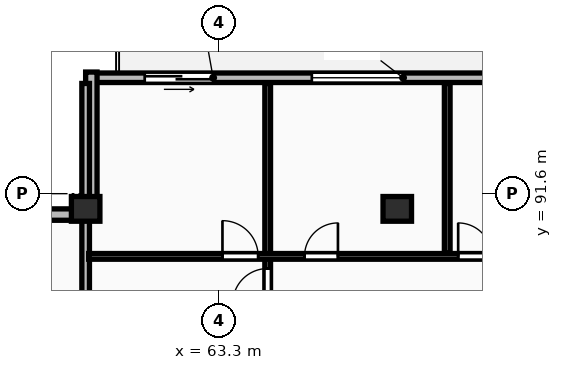
"""IFC4 building model, lengths in metres.
Left out: names, types, materials, properties, quantities, classifications, styles, units other than length and angle.
Written with IfcOpenShell. Run it as: python <this file> out.ifc"""

import sys

from ifc_helpers import new_model, si_unit, direction, frame, frame_2d, origin, origin_2d, place, context, subcontext, project, spatial, rectangle, extrude, element, fill, save


model = new_model("IFC4")
c1 = context("Model", 3, precision=1e-05, world=origin(), true_north=direction((0.0, 1.0)))
c2 = subcontext(c1, "Body", "Model", "MODEL_VIEW")
j1 = project(units=[si_unit("LENGTHUNIT", "METRE"), si_unit("PLANEANGLEUNIT", "RADIAN")], contexts=[c1])
p1 = place(None, origin())
s1 = spatial("IfcSite", under=j1, at=p1, CompositionType="ELEMENT")
p2 = place(p1, origin())
s2 = spatial("IfcBuilding", under=s1, at=p2, CompositionType="ELEMENT")
p3 = place(p2, frame((0.0, 0.0, 256.25)))
s3 = spatial("IfcBuildingStorey", under=s2, at=p3, CompositionType="ELEMENT", Elevation=256.25)
for number, where, z_axis, x_axis in (
    (1, (59.8, 91.2, 0.0), (0.0, 0.0, 1.0), (1.0, 0.0, 0.0)),
    (2, (68.0, 91.2, 0.0), (0.0, 0.0, 1.0), (1.0, 0.0, 0.0)),
):
    element("IfcColumn", number, at=place(p3, frame(where, z_axis=z_axis, x_axis=x_axis)), inside=s3, PredefinedType="COLUMN", context=c2, shape_type="SweptSolid", body=[
        extrude(rectangle(XDim=0.75, YDim=0.65, at=origin_2d()), origin(), (0.0, 0.0, 1.0), 3.45),
    ])
p4 = place(p3, frame((128.4, 94.65, 0.0), z_axis=(0.0, 0.0, 1.0), x_axis=(-1.0, 0.0, 0.0)))
e3 = element("IfcWall", 3, at=p4, inside=s3, PredefinedType="STANDARD", context=c2, shape_type="SweptSolid", body=[
    extrude(rectangle(XDim=68.6, YDim=0.25, at=frame_2d((34.3, 0.0))), origin(), (0.0, 0.0, 1.0), 3.17),
])
p5 = place(p4, frame((60.248, 0.0, 0.85)))
e4 = element("IfcOpeningElement", 4, at=p5, cuts=e3, PredefinedType="OPENING", context=c2, shape_type="SweptSolid", body=[
    extrude(rectangle(XDim=2.4, YDim=1.9, at=frame_2d((1.2, 0.95))), frame((0.0, 0.135, 0.0), z_axis=(0.0, -1.0, 0.0), x_axis=(1.0, 0.0, 0.0)), (0.0, 0.0, 1.0), 0.27),
])
p6 = place(p4, frame((55.523, 0.0, 0.85)))
e5 = element("IfcOpeningElement", 5, at=p6, cuts=e3, PredefinedType="OPENING", context=c2, shape_type="SweptSolid", body=[
    extrude(rectangle(XDim=2.4, YDim=1.9, at=frame_2d((1.2, 0.95))), frame((0.0, 0.135, 0.0), z_axis=(0.0, -1.0, 0.0), x_axis=(1.0, 0.0, 0.0)), (0.0, 0.0, 1.0), 0.27),
])
p7 = place(p4, frame((65.245, 0.0, 0.0)))
e6 = element("IfcOpeningElement", 6, at=p7, cuts=e3, PredefinedType="OPENING", context=c2, shape_type="SweptSolid", body=[
    extrude(rectangle(XDim=1.8, YDim=2.2, at=frame_2d((0.9, 1.1))), frame((0.0, 0.135, 0.0), z_axis=(0.0, -1.0, 0.0), x_axis=(1.0, 0.0, 0.0)), (0.0, 0.0, 1.0), 0.27),
])
p8 = place(p4, frame((50.836, 0.0, 0.85)))
e7 = element("IfcOpeningElement", 7, at=p8, cuts=e3, PredefinedType="OPENING", context=c2, shape_type="SweptSolid", body=[
    extrude(rectangle(XDim=2.4, YDim=1.9, at=frame_2d((1.2, 0.95))), frame((0.0, 0.135, 0.0), z_axis=(0.0, -1.0, 0.0), x_axis=(1.0, 0.0, 0.0)), (0.0, 0.0, 1.0), 0.27),
])
p9 = place(p4, frame((39.76, 0.0, 0.85)))
e8 = element("IfcOpeningElement", 8, at=p9, cuts=e3, PredefinedType="OPENING", context=c2, shape_type="SweptSolid", body=[
    extrude(rectangle(XDim=1.8, YDim=1.8, at=frame_2d((0.9, 0.9))), frame((0.0, 0.135, 0.0), z_axis=(0.0, -1.0, 0.0), x_axis=(1.0, 0.0, 0.0)), (0.0, 0.0, 1.0), 0.27),
])
p10 = place(p4, frame((37.04, 0.0, 0.85)))
e9 = element("IfcOpeningElement", 9, at=p10, cuts=e3, PredefinedType="OPENING", context=c2, shape_type="SweptSolid", body=[
    extrude(rectangle(XDim=1.8, YDim=1.8, at=frame_2d((0.9, 0.9))), frame((0.0, 0.135, 0.0), z_axis=(0.0, -1.0, 0.0), x_axis=(1.0, 0.0, 0.0)), (0.0, 0.0, 1.0), 0.27),
])
p11 = place(p4, frame((44.845, 0.0, 0.0)))
e10 = element("IfcOpeningElement", 10, at=p11, cuts=e3, PredefinedType="OPENING", context=c2, shape_type="SweptSolid", body=[
    extrude(rectangle(XDim=1.8, YDim=2.2, at=frame_2d((0.9, 1.1))), frame((0.0, 0.135, 0.0), z_axis=(0.0, -1.0, 0.0), x_axis=(1.0, 0.0, 0.0)), (0.0, 0.0, 1.0), 0.27),
])
p12 = place(p4, frame((33.056, 0.0, 0.85)))
e11 = element("IfcOpeningElement", 11, at=p12, cuts=e3, PredefinedType="OPENING", context=c2, shape_type="SweptSolid", body=[
    extrude(rectangle(XDim=2.4, YDim=1.9, at=frame_2d((1.2, 0.95))), frame((0.0, 0.135, 0.0), z_axis=(0.0, -1.0, 0.0), x_axis=(1.0, 0.0, 0.0)), (0.0, 0.0, 1.0), 0.27),
])
p13 = place(p4, frame((27.394, 0.0, 0.0)))
e12 = element("IfcOpeningElement", 12, at=p13, cuts=e3, PredefinedType="OPENING", context=c2, shape_type="SweptSolid", body=[
    extrude(rectangle(XDim=1.8, YDim=2.2, at=frame_2d((0.9, 1.1))), frame((0.0, 0.135, 0.0), z_axis=(0.0, -1.0, 0.0), x_axis=(1.0, 0.0, 0.0)), (0.0, 0.0, 1.0), 0.27),
])
p14 = place(p4, frame((18.879, 0.0, 0.85)))
e13 = element("IfcOpeningElement", 13, at=p14, cuts=e3, PredefinedType="OPENING", context=c2, shape_type="SweptSolid", body=[
    extrude(rectangle(XDim=2.4, YDim=1.9, at=frame_2d((1.2, 0.95))), frame((0.0, 0.135, 0.0), z_axis=(0.0, -1.0, 0.0), x_axis=(1.0, 0.0, 0.0)), (0.0, 0.0, 1.0), 0.27),
])
p15 = place(p4, frame((11.048, 0.0, 0.0)))
e14 = element("IfcOpeningElement", 14, at=p15, cuts=e3, PredefinedType="OPENING", context=c2, shape_type="SweptSolid", body=[
    extrude(rectangle(XDim=1.8, YDim=2.2, at=frame_2d((0.9, 1.1))), frame((0.0, 0.135, 0.0), z_axis=(0.0, -1.0, 0.0), x_axis=(1.0, 0.0, 0.0)), (0.0, 0.0, 1.0), 0.27),
])
p16 = place(p4, frame((3.298, 0.0, 0.85)))
e15 = element("IfcOpeningElement", 15, at=p16, cuts=e3, PredefinedType="OPENING", context=c2, shape_type="SweptSolid", body=[
    extrude(rectangle(XDim=2.4, YDim=1.9, at=frame_2d((1.2, 0.95))), frame((0.0, 0.135, 0.0), z_axis=(0.0, -1.0, 0.0), x_axis=(1.0, 0.0, 0.0)), (0.0, 0.0, 1.0), 0.27),
])
for number, where, z_axis, x_axis in (
    (16, (59.95, 94.8, 0.0), (0.0, 0.0, 1.0), (0.0, -1.0, 0.0)),
    (17, (59.8, 91.05, 0.0), (0.0, 0.0, 1.0), (-1.0, 0.0, 0.0)),
):
    element("IfcWall", number, at=place(p3, frame(where, z_axis=z_axis, x_axis=x_axis)), inside=s3, PredefinedType="STANDARD", context=c2, shape_type="SweptSolid", body=[
        extrude(rectangle(XDim=3.6, YDim=0.3, at=frame_2d((1.8, 0.0))), origin(), (0.0, 0.0, 1.0), 3.17),
    ])
p17 = place(p3, frame((59.8, 70.18, 0.0), z_axis=(0.0, 0.0, 1.0), x_axis=(0.0, 1.0, 0.0)))
e18 = element("IfcWall", 18, at=p17, inside=s3, PredefinedType="PARTITIONING", context=c2, shape_type="SweptSolid", body=[
    extrude(rectangle(XDim=24.32, YDim=0.2, at=frame_2d((12.16, 0.0))), origin(), (0.0, 0.0, 1.0), 2.477),
])
p18 = place(p3, frame((69.314, 90.03, 0.0), z_axis=(0.0, 0.0, 1.0), x_axis=(0.0, 1.0, 0.0)))
e19 = element("IfcWall", 19, at=p18, inside=s3, PredefinedType="PARTITIONING", context=c2, shape_type="SweptSolid", body=[
    extrude(rectangle(XDim=4.47, YDim=0.15, at=frame_2d((2.235, 0.0))), origin(), (0.0, 0.0, 1.0), 3.17),
])
p19 = place(p3, frame((64.59, 84.89, 0.0), z_axis=(0.0, 0.0, 1.0), x_axis=(0.0, 1.0, 0.0)))
e20 = element("IfcWall", 20, at=p19, inside=s3, PredefinedType="PARTITIONING", context=c2, shape_type="SweptSolid", body=[
    extrude(rectangle(XDim=9.61, YDim=0.15, at=frame_2d((4.805, 0.0))), origin(), (0.0, 0.0, 1.0), 3.17),
])
p20 = place(p19, frame((3.82, 0.0, 0.0)))
e21 = element("IfcOpeningElement", 21, at=p20, cuts=e20, PredefinedType="OPENING", context=c2, shape_type="SweptSolid", body=[
    extrude(rectangle(XDim=0.92, YDim=2.08, at=frame_2d((0.46, 1.04))), frame((0.0, 0.085, 0.0), z_axis=(0.0, -1.0, 0.0), x_axis=(1.0, 0.0, 0.0)), (0.0, 0.0, 1.0), 0.17),
])
p21 = place(p3, frame((59.88, 89.95, 0.0), z_axis=(0.0, 0.0, 1.0), x_axis=(1.0, 0.0, 0.0)))
e22 = element("IfcWall", 22, at=p21, inside=s3, PredefinedType="PARTITIONING", context=c2, shape_type="SweptSolid", body=[
    extrude(rectangle(XDim=14.159, YDim=0.15, at=frame_2d((7.08, 0.0))), origin(), (0.0, 0.0, 1.0), 3.17),
])
p22 = place(p21, frame((3.52, 0.0, 0.0)))
e23 = element("IfcOpeningElement", 23, at=p22, cuts=e22, PredefinedType="OPENING", context=c2, shape_type="SweptSolid", body=[
    extrude(rectangle(XDim=0.94, YDim=2.1, at=frame_2d((0.47, 1.05))), frame((0.0, 0.085, 0.0), z_axis=(0.0, -1.0, 0.0), x_axis=(1.0, 0.0, 0.0)), (0.0, 0.0, 1.0), 0.17),
])
p23 = place(p21, frame((5.679, 0.0, 0.0)))
e24 = element("IfcOpeningElement", 24, at=p23, cuts=e22, PredefinedType="OPENING", context=c2, shape_type="SweptSolid", body=[
    extrude(rectangle(XDim=0.88, YDim=2.06, at=frame_2d((0.44, 1.03))), frame((0.0, 0.085, 0.0), z_axis=(0.0, -1.0, 0.0), x_axis=(1.0, 0.0, 0.0)), (0.0, 0.0, 1.0), 0.17),
])
p24 = place(p21, frame((9.723, 0.0, 0.0)))
e25 = element("IfcOpeningElement", 25, at=p24, cuts=e22, PredefinedType="OPENING", context=c2, shape_type="SweptSolid", body=[
    extrude(rectangle(XDim=0.88, YDim=2.06, at=frame_2d((0.44, 1.03))), frame((0.0, 0.085, 0.0), z_axis=(0.0, -1.0, 0.0), x_axis=(1.0, 0.0, 0.0)), (0.0, 0.0, 1.0), 0.17),
])
p25 = place(p5, origin())
e26 = element("IfcWindow", 26, at=p25, inside=s3, PartitioningType="DOUBLE_PANEL_VERTICAL", PredefinedType="WINDOW", context=c2, shape_type="SweptSolid", body=[
    extrude(rectangle(XDim=2.4, YDim=1.9, at=frame_2d((1.2, 0.95))), frame((0.0, 0.03, 0.0), z_axis=(0.0, -1.0, 0.0), x_axis=(1.0, 0.0, 0.0)), (0.0, 0.0, 1.0), 0.06),
])
fill(e4, e26)
p26 = place(p7, origin())
e27 = element("IfcDoor", 27, at=p26, inside=s3, OperationType="SLIDING_TO_LEFT", PredefinedType="DOOR", context=c2, shape_type="SweptSolid", body=[
    extrude(rectangle(XDim=1.8, YDim=2.2, at=frame_2d((0.9, 1.1))), frame((0.0, 0.025, 0.0), z_axis=(0.0, -1.0, 0.0), x_axis=(1.0, 0.0, 0.0)), (0.0, 0.0, 1.0), 0.05),
])
fill(e6, e27)
p27 = place(p20, origin())
e28 = element("IfcDoor", 28, at=p27, inside=s3, OperationType="SINGLE_SWING_LEFT", PredefinedType="DOOR", context=c2, shape_type="SweptSolid", body=[
    extrude(rectangle(XDim=0.92, YDim=2.08, at=frame_2d((0.46, 1.04))), frame((0.0, 0.025, 0.0), z_axis=(0.0, -1.0, 0.0), x_axis=(1.0, 0.0, 0.0)), (0.0, 0.0, 1.0), 0.05),
])
fill(e21, e28)
p28 = place(p22, origin())
e29 = element("IfcDoor", 29, at=p28, inside=s3, OperationType="SINGLE_SWING_LEFT", PredefinedType="DOOR", context=c2, shape_type="SweptSolid", body=[
    extrude(rectangle(XDim=0.94, YDim=2.1, at=frame_2d((0.47, 1.05))), frame((0.0, 0.025, 0.0), z_axis=(0.0, -1.0, 0.0), x_axis=(1.0, 0.0, 0.0)), (0.0, 0.0, 1.0), 0.05),
])
fill(e23, e29)
p29 = place(p23, origin())
e30 = element("IfcDoor", 30, at=p29, inside=s3, OperationType="SINGLE_SWING_RIGHT", PredefinedType="DOOR", context=c2, shape_type="SweptSolid", body=[
    extrude(rectangle(XDim=0.88, YDim=2.06, at=frame_2d((0.44, 1.03))), frame((0.0, 0.025, 0.0), z_axis=(0.0, -1.0, 0.0), x_axis=(1.0, 0.0, 0.0)), (0.0, 0.0, 1.0), 0.05),
])
fill(e24, e30)
p30 = place(p24, origin())
e31 = element("IfcDoor", 31, at=p30, inside=s3, OperationType="SINGLE_SWING_LEFT", PredefinedType="DOOR", context=c2, shape_type="SweptSolid", body=[
    extrude(rectangle(XDim=0.88, YDim=2.06, at=frame_2d((0.44, 1.03))), frame((0.0, 0.025, 0.0), z_axis=(0.0, -1.0, 0.0), x_axis=(1.0, 0.0, 0.0)), (0.0, 0.0, 1.0), 0.05),
])
fill(e25, e31)
save(model, sys.argv[1])
